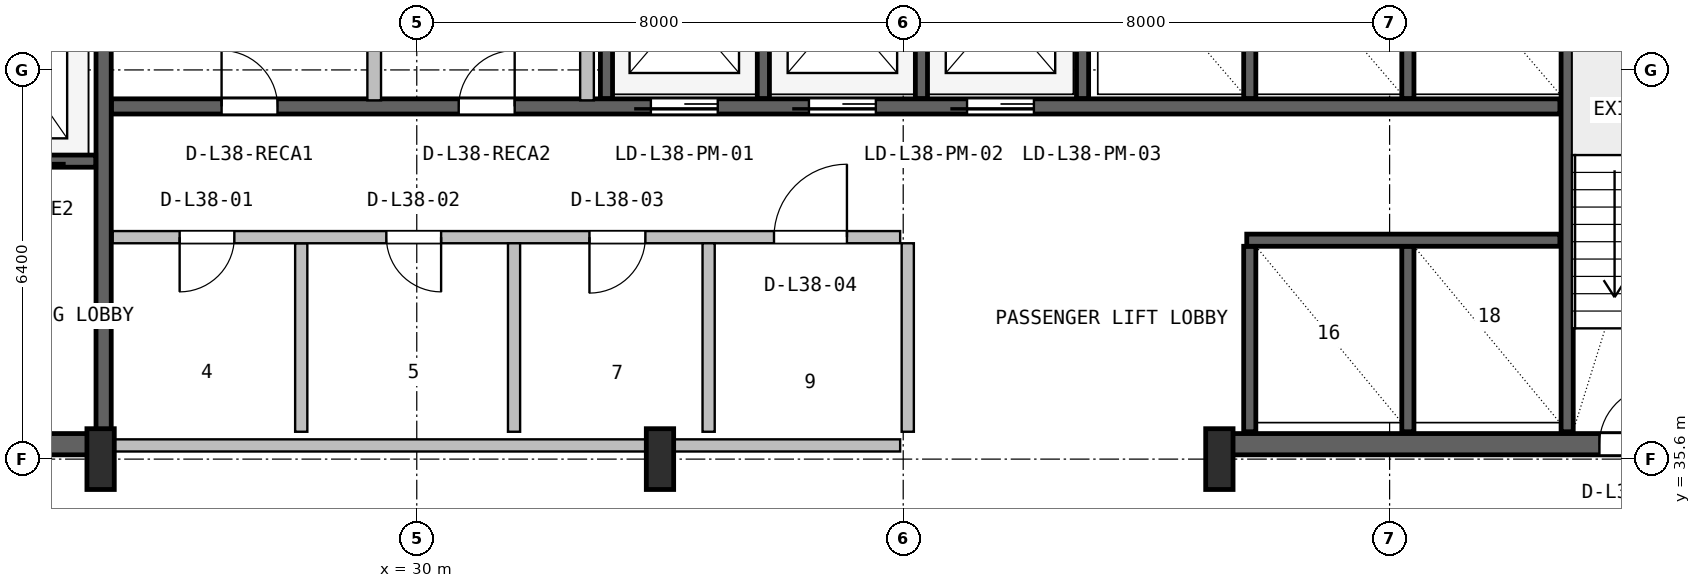
"""IFC4 building model, lengths in metres.
Left out: names, types, materials, properties, quantities, classifications, styles, units other than length and angle.
Written with IfcOpenShell. Run it as: python <this file> out.ifc"""

import sys

from ifc_helpers import new_model, si_unit, direction, frame, frame_2d, origin, origin_2d, place, context, subcontext, project, spatial, rectangle, i_section, extrude, source, transform, mapped, element, fill, save


model = new_model("IFC4")
c1 = context("Model", 3, precision=1e-05, world=origin(), true_north=direction((0.0, 1.0)))
c2 = subcontext(c1, "Body", "Model", "MODEL_VIEW")
j1 = project(units=[si_unit("LENGTHUNIT", "METRE"), si_unit("PLANEANGLEUNIT", "RADIAN")], contexts=[c1])
p1 = place(None, origin())
s1 = spatial("IfcSite", under=j1, at=p1, CompositionType="ELEMENT")
p2 = place(p1, origin())
s2 = spatial("IfcBuilding", under=s1, at=p2, CompositionType="ELEMENT")
p3 = place(p2, frame((0.0, 0.0, 157.2)))
s3 = spatial("IfcBuildingStorey", under=s2, at=p3, CompositionType="ELEMENT", Elevation=157.2)
p4 = place(p3, frame((15.67, 35.845, 0.0), z_axis=(0.0, 0.0, 1.0), x_axis=(1.0, 0.0, 0.0)))
e1 = element("IfcWall", 1, at=p4, inside=s3, PredefinedType="SHEAR", context=c2, shape_type="SweptSolid", body=[
    extrude(rectangle(XDim=9.13, YDim=0.35, at=frame_2d((4.565, 0.0))), origin(), (0.0, 0.0, 1.0), 3.55),
])
p5 = place(p4, frame((5.4, 0.0, 0.0)))
e2 = element("IfcOpeningElement", 2, at=p5, cuts=e1, PredefinedType="OPENING", context=c2, shape_type="SweptSolid", body=[
    extrude(rectangle(XDim=1.0, YDim=2.1, at=frame_2d((0.5, 1.05))), frame((0.0, 0.185, 0.0), z_axis=(0.0, -1.0, 0.0), x_axis=(1.0, 0.0, 0.0)), (0.0, 0.0, 1.0), 0.37),
])
p6 = place(p3, frame((43.2, 35.845, 0.0), z_axis=(0.0, 0.0, 1.0), x_axis=(1.0, 0.0, 0.0)))
e3 = element("IfcWall", 3, at=p6, inside=s3, PredefinedType="SHEAR", context=c2, shape_type="SweptSolid", body=[
    extrude(rectangle(XDim=9.13, YDim=0.35, at=frame_2d((4.565, 0.0))), origin(), (0.0, 0.0, 1.0), 3.55),
])
p7 = place(p6, frame((6.25, 0.0, 0.0)))
e4 = element("IfcOpeningElement", 4, at=p7, cuts=e3, PredefinedType="OPENING", context=c2, shape_type="SweptSolid", body=[
    extrude(rectangle(XDim=0.95, YDim=2.1, at=frame_2d((0.475, 1.05))), frame((0.0, 0.185, 0.0), z_axis=(0.0, -1.0, 0.0), x_axis=(1.0, 0.0, 0.0)), (0.0, 0.0, 1.0), 0.37),
])
m1 = source(origin(), c2, "Body", "SweptSolid", [
    extrude(i_section(OverallWidth=0.45, OverallDepth=1.0, WebThickness=0.016, FlangeThickness=0.03, FilletRadius=0.016, at=origin_2d()), origin(), (0.0, 0.0, 1.0), 3.8),
])
for number, where, z_axis, x_axis in (
    (5, (24.8, 35.6, 0.0), (0.0, 0.0, 1.0), (1.0, 0.0, 0.0)),
    (6, (34.0, 35.6, 0.0), (0.0, 0.0, 1.0), (1.0, 0.0, 0.0)),
    (7, (43.2, 35.6, 0.0), (0.0, 0.0, 1.0), (1.0, 0.0, 0.0)),
):
    element("IfcColumn", number, at=place(p3, frame(where, z_axis=z_axis, x_axis=x_axis)), inside=s3, PredefinedType="COLUMN", context=c2, shape_type="MappedRepresentation", body=[
        mapped(m1, transform((0.0, 0.0, 0.0), x_axis=(1.0, 0.0, 0.0), y_axis=(0.0, 1.0, 0.0), z_axis=(0.0, 0.0, 1.0), scale=1.0)),
    ])
p8 = place(p3, frame((24.85, 36.05, 0.0), z_axis=(0.0, 0.0, 1.0), x_axis=(0.0, 1.0, 0.0)))
e8 = element("IfcWall", 8, at=p8, inside=s3, PredefinedType="SHEAR", context=c2, shape_type="SweptSolid", body=[
    extrude(rectangle(XDim=10.45, YDim=0.25, at=frame_2d((5.225, 0.0))), origin(), (0.0, 0.0, 1.0), 3.55),
])
p9 = place(p3, frame((19.2, 40.5, 0.0), z_axis=(0.0, 0.0, 1.0), x_axis=(1.0, 0.0, 0.0)))
e9 = element("IfcWall", 9, at=p9, inside=s3, PredefinedType="SHEAR", context=c2, shape_type="SweptSolid", body=[
    extrude(rectangle(XDim=5.52, YDim=0.2, at=frame_2d((2.76, 0.0))), origin(), (0.0, 0.0, 1.0), 3.55),
])
p10 = place(p9, frame((1.05, 0.0, 0.0)))
e10 = element("IfcOpeningElement", 10, at=p10, cuts=e9, PredefinedType="OPENING", context=c2, shape_type="SweptSolid", body=[
    extrude(rectangle(XDim=1.1, YDim=2.18, at=frame_2d((0.55, 1.09))), frame((0.0, 0.11, 0.0), z_axis=(0.0, -1.0, 0.0), x_axis=(1.0, 0.0, 0.0)), (0.0, 0.0, 1.0), 0.22),
])
p11 = place(p9, frame((3.65, 0.0, 0.0)))
e11 = element("IfcOpeningElement", 11, at=p11, cuts=e9, PredefinedType="OPENING", context=c2, shape_type="SweptSolid", body=[
    extrude(rectangle(XDim=1.1, YDim=2.18, at=frame_2d((0.55, 1.09))), frame((0.0, 0.11, 0.0), z_axis=(0.0, -1.0, 0.0), x_axis=(1.0, 0.0, 0.0)), (0.0, 0.0, 1.0), 0.22),
])
p12 = place(p3, frame((48.92, 36.05, 0.0), z_axis=(0.0, 0.0, 1.0), x_axis=(0.0, 1.0, 0.0)))
e12 = element("IfcWall", 12, at=p12, inside=s3, PredefinedType="SHEAR", context=c2, shape_type="SweptSolid", body=[
    extrude(rectangle(XDim=10.5, YDim=0.2, at=frame_2d((5.25, 0.0))), origin(), (0.0, 0.0, 1.0), 3.55),
])
p13 = place(p3, frame((24.98, 41.4, 0.0), z_axis=(0.0, 0.0, 1.0), x_axis=(1.0, 0.0, 0.0)))
e13 = element("IfcWall", 13, at=p13, inside=s3, PredefinedType="SHEAR", context=c2, shape_type="SweptSolid", body=[
    extrude(rectangle(XDim=23.82, YDim=0.25, at=frame_2d((11.91, 0.0))), origin(), (0.0, 0.0, 1.0), 3.55),
])
p14 = place(p13, frame((8.87, 0.0, 0.0)))
e14 = element("IfcOpeningElement", 14, at=p14, cuts=e13, PredefinedType="OPENING", context=c2, shape_type="SweptSolid", body=[
    extrude(rectangle(XDim=1.1, YDim=2.18, at=frame_2d((0.55, 1.09))), frame((0.0, 0.135, 0.0), z_axis=(0.0, -1.0, 0.0), x_axis=(1.0, 0.0, 0.0)), (0.0, 0.0, 1.0), 0.27),
])
p15 = place(p13, frame((11.47, 0.0, 0.0)))
e15 = element("IfcOpeningElement", 15, at=p15, cuts=e13, PredefinedType="OPENING", context=c2, shape_type="SweptSolid", body=[
    extrude(rectangle(XDim=1.1, YDim=2.18, at=frame_2d((0.55, 1.09))), frame((0.0, 0.135, 0.0), z_axis=(0.0, -1.0, 0.0), x_axis=(1.0, 0.0, 0.0)), (0.0, 0.0, 1.0), 0.27),
])
p16 = place(p13, frame((14.07, 0.0, 0.0)))
e16 = element("IfcOpeningElement", 16, at=p16, cuts=e13, PredefinedType="OPENING", context=c2, shape_type="SweptSolid", body=[
    extrude(rectangle(XDim=1.1, YDim=2.18, at=frame_2d((0.55, 1.09))), frame((0.0, 0.135, 0.0), z_axis=(0.0, -1.0, 0.0), x_axis=(1.0, 0.0, 0.0)), (0.0, 0.0, 1.0), 0.27),
])
p17 = place(p13, frame((1.81, 0.0, 0.0)))
e17 = element("IfcOpeningElement", 17, at=p17, cuts=e13, PredefinedType="OPENING", context=c2, shape_type="SweptSolid", body=[
    extrude(rectangle(XDim=0.92, YDim=2.08, at=frame_2d((0.46, 1.04))), frame((0.0, 0.135, 0.0), z_axis=(0.0, -1.0, 0.0), x_axis=(1.0, 0.0, 0.0)), (0.0, 0.0, 1.0), 0.27),
])
p18 = place(p13, frame((5.71, 0.0, 0.0)))
e18 = element("IfcOpeningElement", 18, at=p18, cuts=e13, PredefinedType="OPENING", context=c2, shape_type="SweptSolid", body=[
    extrude(rectangle(XDim=0.92, YDim=2.08, at=frame_2d((0.46, 1.04))), frame((0.0, 0.135, 0.0), z_axis=(0.0, -1.0, 0.0), x_axis=(1.0, 0.0, 0.0)), (0.0, 0.0, 1.0), 0.27),
])
p19 = place(p3, frame((33.12, 41.53, 0.0), z_axis=(0.0, 0.0, 1.0), x_axis=(0.0, 1.0, 0.0)))
e19 = element("IfcWall", 19, at=p19, inside=s3, PredefinedType="SHEAR", context=c2, shape_type="SweptSolid", body=[
    extrude(rectangle(XDim=5.02, YDim=0.2, at=frame_2d((2.51, 0.0))), origin(), (0.0, 0.0, 1.0), 3.55),
])
for number, where, z_axis, x_axis in (
    (20, (35.7, 41.53, 0.0), (0.0, 0.0, 1.0), (0.0, 1.0, 0.0)),
    (21, (38.3, 41.53, 0.0), (0.0, 0.0, 1.0), (0.0, 1.0, 0.0)),
):
    element("IfcWall", number, at=place(p3, frame(where, z_axis=z_axis, x_axis=x_axis)), inside=s3, PredefinedType="SHEAR", context=c2, shape_type="SweptSolid", body=[
        extrude(rectangle(XDim=2.87, YDim=0.2, at=frame_2d((1.435, 0.0))), origin(), (0.0, 0.0, 1.0), 3.55),
    ])
p20 = place(p3, frame((40.95, 41.53, 0.0), z_axis=(0.0, 0.0, 1.0), x_axis=(0.0, 1.0, 0.0)))
e22 = element("IfcWall", 22, at=p20, inside=s3, PredefinedType="SHEAR", context=c2, shape_type="SweptSolid", body=[
    extrude(rectangle(XDim=5.02, YDim=0.2, at=frame_2d((2.51, 0.0))), origin(), (0.0, 0.0, 1.0), 3.55),
])
for number, where, z_axis, x_axis in (
    (23, (43.7, 41.53, 0.0), (0.0, 0.0, 1.0), (0.0, 1.0, 0.0)),
    (24, (46.3, 41.53, 0.0), (0.0, 0.0, 1.0), (0.0, 1.0, 0.0)),
):
    element("IfcWall", number, at=place(p3, frame(where, z_axis=z_axis, x_axis=x_axis)), inside=s3, PredefinedType="SHEAR", context=c2, shape_type="SweptSolid", body=[
        extrude(rectangle(XDim=2.87, YDim=0.2, at=frame_2d((1.435, 0.0))), origin(), (0.0, 0.0, 1.0), 3.55),
    ])
for number, where, z_axis, x_axis in (
    (25, (43.7, 36.05, 0.0), (0.0, 0.0, 1.0), (0.0, 1.0, 0.0)),
    (26, (46.3, 36.05, 0.0), (0.0, 0.0, 1.0), (0.0, 1.0, 0.0)),
):
    element("IfcWall", number, at=place(p3, frame(where, z_axis=z_axis, x_axis=x_axis)), inside=s3, PredefinedType="SHEAR", context=c2, shape_type="SweptSolid", body=[
        extrude(rectangle(XDim=3.05, YDim=0.2, at=frame_2d((1.525, 0.0))), origin(), (0.0, 0.0, 1.0), 3.55),
    ])
p21 = place(p3, frame((43.65, 39.2, 0.0), z_axis=(0.0, 0.0, 1.0), x_axis=(1.0, 0.0, 0.0)))
e27 = element("IfcWall", 27, at=p21, inside=s3, PredefinedType="SHEAR", context=c2, shape_type="SweptSolid", body=[
    extrude(rectangle(XDim=5.15, YDim=0.2, at=frame_2d((2.575, 0.0))), origin(), (0.0, 0.0, 1.0), 3.55),
])
p22 = place(p3, frame((25.0, 35.825, 0.0), z_axis=(0.0, 0.0, 1.0), x_axis=(1.0, 0.0, 0.0)))
e28 = element("IfcWall", 28, at=p22, inside=s3, PredefinedType="SOLIDWALL", context=c2, shape_type="SweptSolid", body=[
    extrude(rectangle(XDim=12.95, YDim=0.2, at=frame_2d((6.475, 0.0))), origin(), (0.0, 0.0, 1.0), 2.575),
])
p23 = place(p3, frame((28.1, 36.05, 0.0), z_axis=(0.0, 0.0, 1.0), x_axis=(0.0, 1.0, 0.0)))
e29 = element("IfcWall", 29, at=p23, inside=s3, PredefinedType="PLUMBINGWALL", context=c2, shape_type="SweptSolid", body=[
    extrude(rectangle(XDim=3.1, YDim=0.2, at=frame_2d((1.55, 0.0))), origin(), (0.0, 0.0, 1.0), 3.53),
])
p24 = place(p3, frame((25.0, 39.25, 0.0), z_axis=(0.0, 0.0, 1.0), x_axis=(1.0, 0.0, 0.0)))
e30 = element("IfcWall", 30, at=p24, inside=s3, PredefinedType="SOLIDWALL", context=c2, shape_type="SweptSolid", body=[
    extrude(rectangle(XDim=12.95, YDim=0.2, at=frame_2d((6.475, 0.0))), origin(), (0.0, 0.0, 1.0), 3.53),
])
p25 = place(p24, frame((1.1, 0.0, 0.0)))
e31 = element("IfcOpeningElement", 31, at=p25, cuts=e30, PredefinedType="OPENING", context=c2, shape_type="SweptSolid", body=[
    extrude(rectangle(XDim=0.9, YDim=2.06, at=frame_2d((0.45, 1.03))), frame((0.0, 0.11, 0.0), z_axis=(0.0, -1.0, 0.0), x_axis=(1.0, 0.0, 0.0)), (0.0, 0.0, 1.0), 0.22),
])
p26 = place(p24, frame((4.5, 0.0, 0.0)))
e32 = element("IfcOpeningElement", 32, at=p26, cuts=e30, PredefinedType="OPENING", context=c2, shape_type="SweptSolid", body=[
    extrude(rectangle(XDim=0.9, YDim=2.06, at=frame_2d((0.45, 1.03))), frame((0.0, 0.11, 0.0), z_axis=(0.0, -1.0, 0.0), x_axis=(1.0, 0.0, 0.0)), (0.0, 0.0, 1.0), 0.22),
])
p27 = place(p24, frame((7.84, 0.0, 0.0)))
e33 = element("IfcOpeningElement", 33, at=p27, cuts=e30, PredefinedType="OPENING", context=c2, shape_type="SweptSolid", body=[
    extrude(rectangle(XDim=0.92, YDim=2.08, at=frame_2d((0.46, 1.04))), frame((0.0, 0.11, 0.0), z_axis=(0.0, -1.0, 0.0), x_axis=(1.0, 0.0, 0.0)), (0.0, 0.0, 1.0), 0.22),
])
p28 = place(p24, frame((10.875, 0.0, 0.0)))
e34 = element("IfcOpeningElement", 34, at=p28, cuts=e30, PredefinedType="OPENING", context=c2, shape_type="SweptSolid", body=[
    extrude(rectangle(XDim=1.2, YDim=2.1, at=frame_2d((0.6, 1.05))), frame((0.0, 0.11, 0.0), z_axis=(0.0, -1.0, 0.0), x_axis=(1.0, 0.0, 0.0)), (0.0, 0.0, 1.0), 0.22),
])
p29 = place(p3, frame((31.6, 36.05, 0.0), z_axis=(0.0, 0.0, 1.0), x_axis=(0.0, 1.0, 0.0)))
e35 = element("IfcWall", 35, at=p29, inside=s3, PredefinedType="PLUMBINGWALL", context=c2, shape_type="SweptSolid", body=[
    extrude(rectangle(XDim=3.1, YDim=0.2, at=frame_2d((1.55, 0.0))), origin(), (0.0, 0.0, 1.0), 3.53),
])
for number, where, z_axis, x_axis in (
    (36, (34.8, 36.05, 0.0), (0.0, 0.0, 1.0), (0.0, 1.0, 0.0)),
    (37, (38.075, 36.05, 0.0), (0.0, 0.0, 1.0), (0.0, 1.0, 0.0)),
):
    element("IfcWall", number, at=place(p3, frame(where, z_axis=z_axis, x_axis=x_axis)), inside=s3, PredefinedType="SOLIDWALL", context=c2, shape_type="SweptSolid", body=[
        extrude(rectangle(XDim=3.1, YDim=0.2, at=frame_2d((1.55, 0.0))), origin(), (0.0, 0.0, 1.0), 3.53),
    ])
p30 = place(p3, frame((29.3, 41.5, 0.0), z_axis=(0.0, 0.0, 1.0), x_axis=(0.0, 1.0, 0.0)))
e38 = element("IfcWall", 38, at=p30, inside=s3, PredefinedType="PARTITIONING", context=c2, shape_type="SweptSolid", body=[
    extrude(rectangle(XDim=2.288, YDim=0.225, at=frame_2d((1.144, 0.0))), origin(), (0.0, 0.0, 1.0), 3.53),
])
p31 = place(p3, frame((32.8, 41.5, 0.0), z_axis=(0.0, 0.0, 1.0), x_axis=(0.0, 1.0, 0.0)))
e39 = element("IfcWall", 39, at=p31, inside=s3, PredefinedType="PARTITIONING", context=c2, shape_type="SweptSolid", body=[
    extrude(rectangle(XDim=5.02, YDim=0.225, at=frame_2d((2.51, 0.0))), origin(), (0.0, 0.0, 1.0), 3.53),
])
m2 = source(origin(), c2, "Body", "SweptSolid", [
    extrude(rectangle(XDim=0.95, YDim=2.1, at=frame_2d((0.475, 1.05))), frame((0.0, 0.025, 0.0), z_axis=(0.0, -1.0, 0.0), x_axis=(1.0, 0.0, 0.0)), (0.0, 0.0, 1.0), 0.05),
])
p32 = place(p7, origin())
e40 = element("IfcDoor", 40, at=p32, inside=s3, OperationType="SINGLE_SWING_RIGHT", PredefinedType="DOOR", context=c2, shape_type="MappedRepresentation", body=[
    mapped(m2, transform((0.0, 0.0, 0.0), x_axis=(1.0, 0.0, 0.0), y_axis=(0.0, 1.0, 0.0), z_axis=(0.0, 0.0, 1.0), scale=1.0)),
])
fill(e4, e40)
m3 = source(origin(), c2, "Body", "SweptSolid", [
    extrude(rectangle(XDim=1.1, YDim=2.18, at=frame_2d((0.55, 1.09))), frame((0.0, 0.025, 0.0), z_axis=(0.0, -1.0, 0.0), x_axis=(1.0, 0.0, 0.0)), (0.0, 0.0, 1.0), 0.05),
])
p33 = place(p14, frame((1.1, 0.0, 0.0), z_axis=(0.0, 0.0, 1.0), x_axis=(-1.0, 0.0, 0.0)))
e41 = element("IfcDoor", 41, at=p33, inside=s3, OperationType="SLIDING_TO_LEFT", PredefinedType="DOOR", context=c2, shape_type="MappedRepresentation", body=[
    mapped(m3, transform((0.0, 0.0, 0.0), x_axis=(1.0, 0.0, 0.0), y_axis=(0.0, 1.0, 0.0), z_axis=(0.0, 0.0, 1.0), scale=1.0)),
])
fill(e14, e41)
p34 = place(p15, frame((1.1, 0.0, 0.0), z_axis=(0.0, 0.0, 1.0), x_axis=(-1.0, 0.0, 0.0)))
e42 = element("IfcDoor", 42, at=p34, inside=s3, OperationType="SLIDING_TO_LEFT", PredefinedType="DOOR", context=c2, shape_type="MappedRepresentation", body=[
    mapped(m3, transform((0.0, 0.0, 0.0), x_axis=(1.0, 0.0, 0.0), y_axis=(0.0, 1.0, 0.0), z_axis=(0.0, 0.0, 1.0), scale=1.0)),
])
fill(e15, e42)
p35 = place(p16, frame((1.1, 0.0, 0.0), z_axis=(0.0, 0.0, 1.0), x_axis=(-1.0, 0.0, 0.0)))
e43 = element("IfcDoor", 43, at=p35, inside=s3, OperationType="SLIDING_TO_LEFT", PredefinedType="DOOR", context=c2, shape_type="MappedRepresentation", body=[
    mapped(m3, transform((0.0, 0.0, 0.0), x_axis=(1.0, 0.0, 0.0), y_axis=(0.0, 1.0, 0.0), z_axis=(0.0, 0.0, 1.0), scale=1.0)),
])
fill(e16, e43)
m4 = source(origin(), c2, "Body", "SweptSolid", [
    extrude(rectangle(XDim=0.92, YDim=2.08, at=frame_2d((0.46, 1.04))), frame((0.0, 0.025, 0.0), z_axis=(0.0, -1.0, 0.0), x_axis=(1.0, 0.0, 0.0)), (0.0, 0.0, 1.0), 0.05),
])
p36 = place(p17, origin())
e44 = element("IfcDoor", 44, at=p36, inside=s3, OperationType="SINGLE_SWING_LEFT", PredefinedType="DOOR", context=c2, shape_type="MappedRepresentation", body=[
    mapped(m4, transform((0.0, 0.0, 0.0), x_axis=(1.0, 0.0, 0.0), y_axis=(0.0, 1.0, 0.0), z_axis=(0.0, 0.0, 1.0), scale=1.0)),
])
fill(e17, e44)
p37 = place(p18, origin())
e45 = element("IfcDoor", 45, at=p37, inside=s3, OperationType="SINGLE_SWING_RIGHT", PredefinedType="DOOR", context=c2, shape_type="MappedRepresentation", body=[
    mapped(m4, transform((0.0, 0.0, 0.0), x_axis=(1.0, 0.0, 0.0), y_axis=(0.0, 1.0, 0.0), z_axis=(0.0, 0.0, 1.0), scale=1.0)),
])
fill(e18, e45)
m5 = source(origin(), c2, "Body", "SweptSolid", [
    extrude(rectangle(XDim=0.9, YDim=2.06, at=frame_2d((0.45, 1.03))), frame((0.0, 0.025, 0.0), z_axis=(0.0, -1.0, 0.0), x_axis=(1.0, 0.0, 0.0)), (0.0, 0.0, 1.0), 0.05),
])
p38 = place(p25, frame((0.9, 0.0, 0.0), z_axis=(0.0, 0.0, 1.0), x_axis=(-1.0, 0.0, 0.0)))
e46 = element("IfcDoor", 46, at=p38, inside=s3, OperationType="SINGLE_SWING_LEFT", PredefinedType="DOOR", context=c2, shape_type="MappedRepresentation", body=[
    mapped(m5, transform((0.0, 0.0, 0.0), x_axis=(1.0, 0.0, 0.0), y_axis=(0.0, 1.0, 0.0), z_axis=(0.0, 0.0, 1.0), scale=1.0)),
])
fill(e31, e46)
p39 = place(p26, frame((0.9, 0.0, 0.0), z_axis=(0.0, 0.0, 1.0), x_axis=(-1.0, 0.0, 0.0)))
e47 = element("IfcDoor", 47, at=p39, inside=s3, OperationType="SINGLE_SWING_RIGHT", PredefinedType="DOOR", context=c2, shape_type="MappedRepresentation", body=[
    mapped(m5, transform((0.0, 0.0, 0.0), x_axis=(1.0, 0.0, 0.0), y_axis=(0.0, 1.0, 0.0), z_axis=(0.0, 0.0, 1.0), scale=1.0)),
])
fill(e32, e47)
p40 = place(p27, frame((0.92, 0.0, 0.0), z_axis=(0.0, 0.0, 1.0), x_axis=(-1.0, 0.0, 0.0)))
e48 = element("IfcDoor", 48, at=p40, inside=s3, OperationType="SINGLE_SWING_LEFT", PredefinedType="DOOR", context=c2, shape_type="MappedRepresentation", body=[
    mapped(m4, transform((0.0, 0.0, 0.0), x_axis=(1.0, 0.0, 0.0), y_axis=(0.0, 1.0, 0.0), z_axis=(0.0, 0.0, 1.0), scale=1.0)),
])
fill(e33, e48)
m6 = source(origin(), c2, "Body", "SweptSolid", [
    extrude(rectangle(XDim=1.2, YDim=2.1, at=frame_2d((0.6, 1.05))), frame((0.0, 0.025, 0.0), z_axis=(0.0, -1.0, 0.0), x_axis=(1.0, 0.0, 0.0)), (0.0, 0.0, 1.0), 0.05),
])
p41 = place(p28, origin())
e49 = element("IfcDoor", 49, at=p41, inside=s3, OperationType="SINGLE_SWING_RIGHT", PredefinedType="DOOR", context=c2, shape_type="MappedRepresentation", body=[
    mapped(m6, transform((0.0, 0.0, 0.0), x_axis=(1.0, 0.0, 0.0), y_axis=(0.0, 1.0, 0.0), z_axis=(0.0, 0.0, 1.0), scale=1.0)),
])
fill(e34, e49)
save(model, sys.argv[1])
